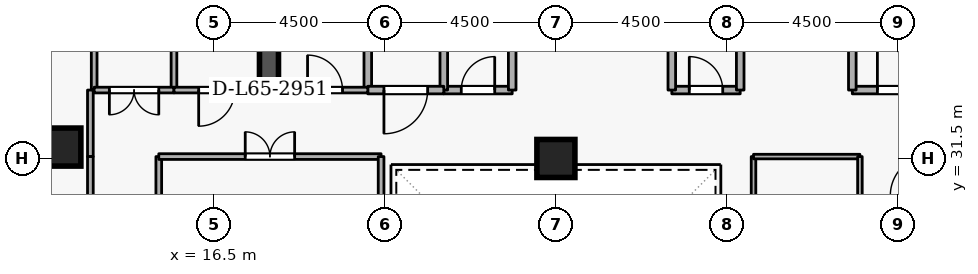
"""IFC4 building model, lengths in metres.
Left out: names, types, materials, properties, quantities, classifications, styles, units other than length and angle.
Written with IfcOpenShell. Run it as: python <this file> out.ifc"""

import sys

from ifc_helpers import new_model, si_unit, direction, frame, frame_2d, origin, origin_2d, place, context, subcontext, project, spatial, rectangle, extrude, element, fill, save


model = new_model("IFC4")
c1 = context("Model", 3, precision=1e-05, world=origin(), true_north=direction((0.0, 1.0)))
c2 = subcontext(c1, "Body", "Model", "MODEL_VIEW")
j1 = project(units=[si_unit("LENGTHUNIT", "METRE"), si_unit("PLANEANGLEUNIT", "RADIAN")], contexts=[c1])
p1 = place(None, origin())
s1 = spatial("IfcSite", under=j1, at=p1, CompositionType="ELEMENT")
p2 = place(p1, origin())
s2 = spatial("IfcBuilding", under=s1, at=p2, CompositionType="ELEMENT")
p3 = place(p2, frame((0.0, 0.0, 243.9)))
s3 = spatial("IfcBuildingStorey", under=s2, at=p3, CompositionType="ELEMENT", Elevation=243.9)
p4 = place(p3, frame((17.95, 33.1, 0.0), z_axis=(0.0, 0.0, 1.0), x_axis=(0.0, 1.0, 0.0)))
e1 = element("IfcWall", 1, at=p4, inside=s3, PredefinedType="SHEAR", context=c2, shape_type="SweptSolid", body=[
    extrude(rectangle(XDim=5.8, YDim=0.5, at=frame_2d((2.9, 0.0))), origin(), (0.0, 0.0, 1.0), 3.6),
])
for number, where, z_axis, x_axis in (
    (2, (12.5, 31.8, 0.0), (0.0, 0.0, 1.0), (1.0, 0.0, 0.0)),
    (3, (25.5, 31.5, 0.0), (0.0, 0.0, 1.0), (1.0, 0.0, 0.0)),
):
    element("IfcColumn", number, at=place(p3, frame(where, z_axis=z_axis, x_axis=x_axis)), inside=s3, PredefinedType="COLUMN", context=c2, shape_type="SweptSolid", body=[
        extrude(rectangle(XDim=1.0, YDim=1.0, at=origin_2d()), origin(), (0.0, 0.0, 1.0), 3.6),
    ])
p5 = place(p3, frame((33.3, 33.3, 0.0), z_axis=(0.0, 0.0, 1.0), x_axis=(1.0, 0.0, 0.0)))
e4 = element("IfcWall", 4, at=p5, inside=s3, PredefinedType="STANDARD", context=c2, shape_type="SweptSolid", body=[
    extrude(rectangle(XDim=2.5, YDim=0.2, at=frame_2d((1.25, 0.0))), origin(), (0.0, 0.0, 1.0), 3.34),
])
p6 = place(p5, frame((0.66, 0.0, 0.0)))
e5 = element("IfcOpeningElement", 5, at=p6, cuts=e4, PredefinedType="OPENING", context=c2, shape_type="SweptSolid", body=[
    extrude(rectangle(XDim=1.15, YDim=2.1, at=frame_2d((0.575, 1.05))), frame((0.0, 0.11, 0.0), z_axis=(0.0, -1.0, 0.0), x_axis=(1.0, 0.0, 0.0)), (0.0, 0.0, 1.0), 0.22),
])
p7 = place(p3, frame((33.3, 35.6, 0.0), z_axis=(0.0, 0.0, 1.0), x_axis=(0.0, -1.0, 0.0)))
e6 = element("IfcWall", 6, at=p7, inside=s3, PredefinedType="STANDARD", context=c2, shape_type="SweptSolid", body=[
    extrude(rectangle(XDim=2.3, YDim=0.2, at=frame_2d((1.15, 0.0))), origin(), (0.0, 0.0, 1.0), 2.545),
])
p8 = place(p3, frame((22.55, 33.3, 0.0), z_axis=(0.0, 0.0, 1.0), x_axis=(1.0, 0.0, 0.0)))
e7 = element("IfcWall", 7, at=p8, inside=s3, PredefinedType="STANDARD", context=c2, shape_type="SweptSolid", body=[
    extrude(rectangle(XDim=1.8, YDim=0.2, at=frame_2d((0.9, 0.0))), origin(), (0.0, 0.0, 1.0), 3.34),
])
p9 = place(p8, frame((0.46, 0.0, 0.0)))
e8 = element("IfcOpeningElement", 8, at=p9, cuts=e7, PredefinedType="OPENING", context=c2, shape_type="SweptSolid", body=[
    extrude(rectangle(XDim=0.88, YDim=2.04, at=frame_2d((0.44, 1.02))), frame((0.0, 0.11, 0.0), z_axis=(0.0, -1.0, 0.0), x_axis=(1.0, 0.0, 0.0)), (0.0, 0.0, 1.0), 0.22),
])
for number, where, z_axis, x_axis in (
    (9, (24.35, 33.3, 0.0), (0.0, 0.0, 1.0), (0.0, 1.0, 0.0)),
    (10, (22.55, 35.35, 0.0), (0.0, 0.0, 1.0), (0.0, -1.0, 0.0)),
):
    element("IfcWall", number, at=place(p3, frame(where, z_axis=z_axis, x_axis=x_axis)), inside=s3, PredefinedType="STANDARD", context=c2, shape_type="SweptSolid", body=[
        extrude(rectangle(XDim=2.05, YDim=0.2, at=frame_2d((1.025, 0.0))), origin(), (0.0, 0.0, 1.0), 3.34),
    ])
p10 = place(p3, frame((28.55, 33.3, 0.0), z_axis=(0.0, 0.0, 1.0), x_axis=(1.0, 0.0, 0.0)))
e11 = element("IfcWall", 11, at=p10, inside=s3, PredefinedType="STANDARD", context=c2, shape_type="SweptSolid", body=[
    extrude(rectangle(XDim=1.8, YDim=0.2, at=frame_2d((0.9, 0.0))), origin(), (0.0, 0.0, 1.0), 3.34),
])
p11 = place(p10, frame((0.46, 0.0, 0.0)))
e12 = element("IfcOpeningElement", 12, at=p11, cuts=e11, PredefinedType="OPENING", context=c2, shape_type="SweptSolid", body=[
    extrude(rectangle(XDim=0.88, YDim=2.04, at=frame_2d((0.44, 1.02))), frame((0.0, 0.11, 0.0), z_axis=(0.0, -1.0, 0.0), x_axis=(1.0, 0.0, 0.0)), (0.0, 0.0, 1.0), 0.22),
])
for number, where, z_axis, x_axis in (
    (13, (30.35, 33.3, 0.0), (0.0, 0.0, 1.0), (0.0, 1.0, 0.0)),
    (14, (28.55, 35.35, 0.0), (0.0, 0.0, 1.0), (0.0, -1.0, 0.0)),
    (15, (20.55, 33.3, 0.0), (0.0, 0.0, 1.0), (0.0, 1.0, 0.0)),
):
    element("IfcWall", number, at=place(p3, frame(where, z_axis=z_axis, x_axis=x_axis)), inside=s3, PredefinedType="STANDARD", context=c2, shape_type="SweptSolid", body=[
        extrude(rectangle(XDim=2.05, YDim=0.2, at=frame_2d((1.025, 0.0))), origin(), (0.0, 0.0, 1.0), 3.34),
    ])
p12 = place(p3, frame((22.55, 33.3, 0.0), z_axis=(0.0, 0.0, 1.0), x_axis=(-1.0, 0.0, 0.0)))
e16 = element("IfcWall", 16, at=p12, inside=s3, PredefinedType="STANDARD", context=c2, shape_type="SweptSolid", body=[
    extrude(rectangle(XDim=2.0, YDim=0.2, at=frame_2d((1.0, 0.0))), origin(), (0.0, 0.0, 1.0), 3.34),
])
p13 = place(p12, frame((0.425, 0.0, 0.0)))
e17 = element("IfcOpeningElement", 17, at=p13, cuts=e16, PredefinedType="OPENING", context=c2, shape_type="SweptSolid", body=[
    extrude(rectangle(XDim=1.15, YDim=2.1, at=frame_2d((0.575, 1.05))), frame((0.0, 0.11, 0.0), z_axis=(0.0, -1.0, 0.0), x_axis=(1.0, 0.0, 0.0)), (0.0, 0.0, 1.0), 0.22),
])
p14 = place(p3, frame((18.3, 33.3, 0.0), z_axis=(0.0, 0.0, 1.0), x_axis=(1.0, 0.0, 0.0)))
e18 = element("IfcWall", 18, at=p14, inside=s3, PredefinedType="PARTITIONING", context=c2, shape_type="SweptSolid", body=[
    extrude(rectangle(XDim=2.25, YDim=0.15, at=frame_2d((1.125, 0.0))), origin(), (0.0, 0.0, 1.0), 3.34),
])
p15 = place(p14, frame((0.665, 0.0, 0.0)))
e19 = element("IfcOpeningElement", 19, at=p15, cuts=e18, PredefinedType="OPENING", context=c2, shape_type="SweptSolid", body=[
    extrude(rectangle(XDim=0.92, YDim=2.08, at=frame_2d((0.46, 1.04))), frame((0.0, 0.085, 0.0), z_axis=(0.0, -1.0, 0.0), x_axis=(1.0, 0.0, 0.0)), (0.0, 0.0, 1.0), 0.17),
])
for number, where, z_axis, x_axis in (
    (20, (13.35, 33.3, 0.0), (0.0, 0.0, 1.0), (0.0, 1.0, 0.0)),
    (21, (15.45, 44.72, 0.0), (0.0, 0.0, 1.0), (0.0, -1.0, 0.0)),
):
    element("IfcWall", number, at=place(p3, frame(where, z_axis=z_axis, x_axis=x_axis)), inside=s3, PredefinedType="PARTITIONING", context=c2, shape_type="SweptSolid", body=[
        extrude(rectangle(XDim=11.42, YDim=0.15, at=frame_2d((5.71, 0.0))), origin(), (0.0, 0.0, 1.0), 3.34),
    ])
p16 = place(p3, frame((15.45, 33.3, 0.0), z_axis=(0.0, 0.0, 1.0), x_axis=(-1.0, 0.0, 0.0)))
e22 = element("IfcWall", 22, at=p16, inside=s3, PredefinedType="PARTITIONING", context=c2, shape_type="SweptSolid", body=[
    extrude(rectangle(XDim=2.1, YDim=0.15, at=frame_2d((1.05, 0.0))), origin(), (0.0, 0.0, 1.0), 3.34),
])
p17 = place(p16, frame((0.4, 0.0, 0.0)))
e23 = element("IfcOpeningElement", 23, at=p17, cuts=e22, PredefinedType="OPENING", context=c2, shape_type="SweptSolid", body=[
    extrude(rectangle(XDim=1.3, YDim=2.12, at=frame_2d((0.65, 1.06))), frame((0.0, 0.085, 0.0), z_axis=(0.0, -1.0, 0.0), x_axis=(1.0, 0.0, 0.0)), (0.0, 0.0, 1.0), 0.17),
])
p18 = place(p3, frame((17.7, 33.3, 0.0), z_axis=(0.0, 0.0, 1.0), x_axis=(-1.0, 0.0, 0.0)))
e24 = element("IfcWall", 24, at=p18, inside=s3, PredefinedType="PARTITIONING", context=c2, shape_type="SweptSolid", body=[
    extrude(rectangle(XDim=2.25, YDim=0.15, at=frame_2d((1.125, 0.0))), origin(), (0.0, 0.0, 1.0), 3.34),
])
p19 = place(p18, frame((0.65, 0.0, 0.0)))
e25 = element("IfcOpeningElement", 25, at=p19, cuts=e24, PredefinedType="OPENING", context=c2, shape_type="SweptSolid", body=[
    extrude(rectangle(XDim=0.95, YDim=2.1, at=frame_2d((0.475, 1.05))), frame((0.0, 0.085, 0.0), z_axis=(0.0, -1.0, 0.0), x_axis=(1.0, 0.0, 0.0)), (0.0, 0.0, 1.0), 0.17),
])
p20 = place(p3, frame((13.25, 33.3, 0.0), z_axis=(0.0, 0.0, 1.0), x_axis=(0.0, -1.0, 0.0)))
e26 = element("IfcWall", 26, at=p20, inside=s3, PredefinedType="PARTITIONING", context=c2, shape_type="SweptSolid", body=[
    extrude(rectangle(XDim=1.75, YDim=0.15, at=frame_2d((0.875, 0.0))), origin(), (0.0, 0.0, 1.0), 3.34),
])
p21 = place(p3, frame((13.25, 31.55, 0.0), z_axis=(0.0, 0.0, 1.0), x_axis=(0.0, -1.0, 0.0)))
e27 = element("IfcWall", 27, at=p21, inside=s3, PredefinedType="PARTITIONING", context=c2, shape_type="SweptSolid", body=[
    extrude(rectangle(XDim=3.35, YDim=0.15, at=frame_2d((1.675, 0.0))), origin(), (0.0, 0.0, 1.0), 3.34),
])
p22 = place(p21, frame((1.025, 0.0, 0.0)))
e28 = element("IfcOpeningElement", 28, at=p22, cuts=e27, PredefinedType="OPENING", context=c2, shape_type="SweptSolid", body=[
    extrude(rectangle(XDim=1.3, YDim=2.12, at=frame_2d((0.65, 1.06))), frame((0.0, 0.085, 0.0), z_axis=(0.0, -1.0, 0.0), x_axis=(1.0, 0.0, 0.0)), (0.0, 0.0, 1.0), 0.17),
])
p23 = place(p3, frame((15.05, 28.2, 0.0), z_axis=(0.0, 0.0, 1.0), x_axis=(0.0, 1.0, 0.0)))
e29 = element("IfcWall", 29, at=p23, inside=s3, PredefinedType="PARTITIONING", context=c2, shape_type="SweptSolid", body=[
    extrude(rectangle(XDim=3.35, YDim=0.15, at=frame_2d((1.675, 0.0))), origin(), (0.0, 0.0, 1.0), 3.34),
])
p24 = place(p3, frame((15.05, 31.55, 0.0), z_axis=(0.0, 0.0, 1.0), x_axis=(1.0, 0.0, 0.0)))
e30 = element("IfcWall", 30, at=p24, inside=s3, PredefinedType="PARTITIONING", context=c2, shape_type="SweptSolid", body=[
    extrude(rectangle(XDim=5.85, YDim=0.15, at=frame_2d((2.925, 0.0))), origin(), (0.0, 0.0, 1.0), 3.34),
])
p25 = place(p24, frame((2.275, 0.0, 0.0)))
e31 = element("IfcOpeningElement", 31, at=p25, cuts=e30, PredefinedType="OPENING", context=c2, shape_type="SweptSolid", body=[
    extrude(rectangle(XDim=1.3, YDim=2.12, at=frame_2d((0.65, 1.06))), frame((0.0, 0.085, 0.0), z_axis=(0.0, -1.0, 0.0), x_axis=(1.0, 0.0, 0.0)), (0.0, 0.0, 1.0), 0.17),
])
p26 = place(p3, frame((20.9, 31.55, 0.0), z_axis=(0.0, 0.0, 1.0), x_axis=(0.0, -1.0, 0.0)))
e32 = element("IfcWall", 32, at=p26, inside=s3, PredefinedType="PARTITIONING", context=c2, shape_type="SweptSolid", body=[
    extrude(rectangle(XDim=3.35, YDim=0.15, at=frame_2d((1.675, 0.0))), origin(), (0.0, 0.0, 1.0), 3.34),
])
p27 = place(p3, frame((30.7, 27.0, 0.0), z_axis=(0.0, 0.0, 1.0), x_axis=(0.0, 1.0, 0.0)))
e33 = element("IfcWall", 33, at=p27, inside=s3, PredefinedType="PARTITIONING", context=c2, shape_type="SweptSolid", body=[
    extrude(rectangle(XDim=4.55, YDim=0.12, at=frame_2d((2.275, 0.0))), origin(), (0.0, 0.0, 1.0), 3.34),
])
p28 = place(p3, frame((30.7, 31.55, 0.0), z_axis=(0.0, 0.0, 1.0), x_axis=(1.0, 0.0, 0.0)))
e34 = element("IfcWall", 34, at=p28, inside=s3, PredefinedType="PARTITIONING", context=c2, shape_type="SweptSolid", body=[
    extrude(rectangle(XDim=2.8, YDim=0.12, at=frame_2d((1.4, 0.0))), origin(), (0.0, 0.0, 1.0), 3.34),
])
p29 = place(p3, frame((33.5, 31.55, 0.0), z_axis=(0.0, 0.0, 1.0), x_axis=(0.0, -1.0, 0.0)))
e35 = element("IfcWall", 35, at=p29, inside=s3, PredefinedType="PARTITIONING", context=c2, shape_type="SweptSolid", body=[
    extrude(rectangle(XDim=4.55, YDim=0.12, at=frame_2d((2.275, 0.0))), origin(), (0.0, 0.0, 1.0), 3.34),
])
p30 = place(p29, frame((1.8, 0.0, 0.0)))
e36 = element("IfcOpeningElement", 36, at=p30, cuts=e35, PredefinedType="OPENING", context=c2, shape_type="SweptSolid", body=[
    extrude(rectangle(XDim=0.95, YDim=2.1, at=frame_2d((0.475, 1.05))), frame((0.0, 0.07, 0.0), z_axis=(0.0, -1.0, 0.0), x_axis=(1.0, 0.0, 0.0)), (0.0, 0.0, 1.0), 0.14),
])
p31 = place(p6, origin())
e37 = element("IfcDoor", 37, at=p31, inside=s3, OperationType="SINGLE_SWING_LEFT", PredefinedType="DOOR", context=c2, shape_type="SweptSolid", body=[
    extrude(rectangle(XDim=1.15, YDim=2.1, at=frame_2d((0.575, 1.05))), frame((0.0, 0.025, 0.0), z_axis=(0.0, -1.0, 0.0), x_axis=(1.0, 0.0, 0.0)), (0.0, 0.0, 1.0), 0.05),
])
fill(e5, e37)
p32 = place(p9, origin())
e38 = element("IfcDoor", 38, at=p32, inside=s3, OperationType="SINGLE_SWING_RIGHT", PredefinedType="DOOR", context=c2, shape_type="SweptSolid", body=[
    extrude(rectangle(XDim=0.88, YDim=2.04, at=frame_2d((0.44, 1.02))), frame((0.0, 0.025, 0.0), z_axis=(0.0, -1.0, 0.0), x_axis=(1.0, 0.0, 0.0)), (0.0, 0.0, 1.0), 0.05),
])
fill(e8, e38)
p33 = place(p11, origin())
e39 = element("IfcDoor", 39, at=p33, inside=s3, OperationType="SINGLE_SWING_LEFT", PredefinedType="DOOR", context=c2, shape_type="SweptSolid", body=[
    extrude(rectangle(XDim=0.88, YDim=2.04, at=frame_2d((0.44, 1.02))), frame((0.0, 0.025, 0.0), z_axis=(0.0, -1.0, 0.0), x_axis=(1.0, 0.0, 0.0)), (0.0, 0.0, 1.0), 0.05),
])
fill(e12, e39)
p34 = place(p15, origin())
e40 = element("IfcDoor", 40, at=p34, inside=s3, OperationType="SINGLE_SWING_LEFT", PredefinedType="DOOR", context=c2, shape_type="SweptSolid", body=[
    extrude(rectangle(XDim=0.92, YDim=2.08, at=frame_2d((0.46, 1.04))), frame((0.0, 0.025, 0.0), z_axis=(0.0, -1.0, 0.0), x_axis=(1.0, 0.0, 0.0)), (0.0, 0.0, 1.0), 0.05),
])
fill(e19, e40)
p35 = place(p13, origin())
e41 = element("IfcDoor", 41, at=p35, inside=s3, OperationType="SINGLE_SWING_RIGHT", PredefinedType="DOOR", context=c2, shape_type="SweptSolid", body=[
    extrude(rectangle(XDim=1.15, YDim=2.1, at=frame_2d((0.575, 1.05))), frame((0.0, 0.025, 0.0), z_axis=(0.0, -1.0, 0.0), x_axis=(1.0, 0.0, 0.0)), (0.0, 0.0, 1.0), 0.05),
])
fill(e17, e41)
p36 = place(p17, origin())
e42 = element("IfcDoor", 42, at=p36, inside=s3, OperationType="DOUBLE_DOOR_SINGLE_SWING", PredefinedType="DOOR", context=c2, shape_type="SweptSolid", body=[
    extrude(rectangle(XDim=1.3, YDim=2.12, at=frame_2d((0.65, 1.06))), frame((0.0, 0.025, 0.0), z_axis=(0.0, -1.0, 0.0), x_axis=(1.0, 0.0, 0.0)), (0.0, 0.0, 1.0), 0.05),
])
fill(e23, e42)
p37 = place(p19, origin())
e43 = element("IfcDoor", 43, at=p37, inside=s3, OperationType="SINGLE_SWING_RIGHT", PredefinedType="DOOR", context=c2, shape_type="SweptSolid", body=[
    extrude(rectangle(XDim=0.95, YDim=2.1, at=frame_2d((0.475, 1.05))), frame((0.0, 0.025, 0.0), z_axis=(0.0, -1.0, 0.0), x_axis=(1.0, 0.0, 0.0)), (0.0, 0.0, 1.0), 0.05),
])
fill(e25, e43)
p38 = place(p25, origin())
e44 = element("IfcDoor", 44, at=p38, inside=s3, OperationType="DOUBLE_DOOR_SINGLE_SWING", PredefinedType="DOOR", context=c2, shape_type="SweptSolid", body=[
    extrude(rectangle(XDim=1.3, YDim=2.12, at=frame_2d((0.65, 1.06))), frame((0.0, 0.025, 0.0), z_axis=(0.0, -1.0, 0.0), x_axis=(1.0, 0.0, 0.0)), (0.0, 0.0, 1.0), 0.05),
])
fill(e31, e44)
save(model, sys.argv[1])
